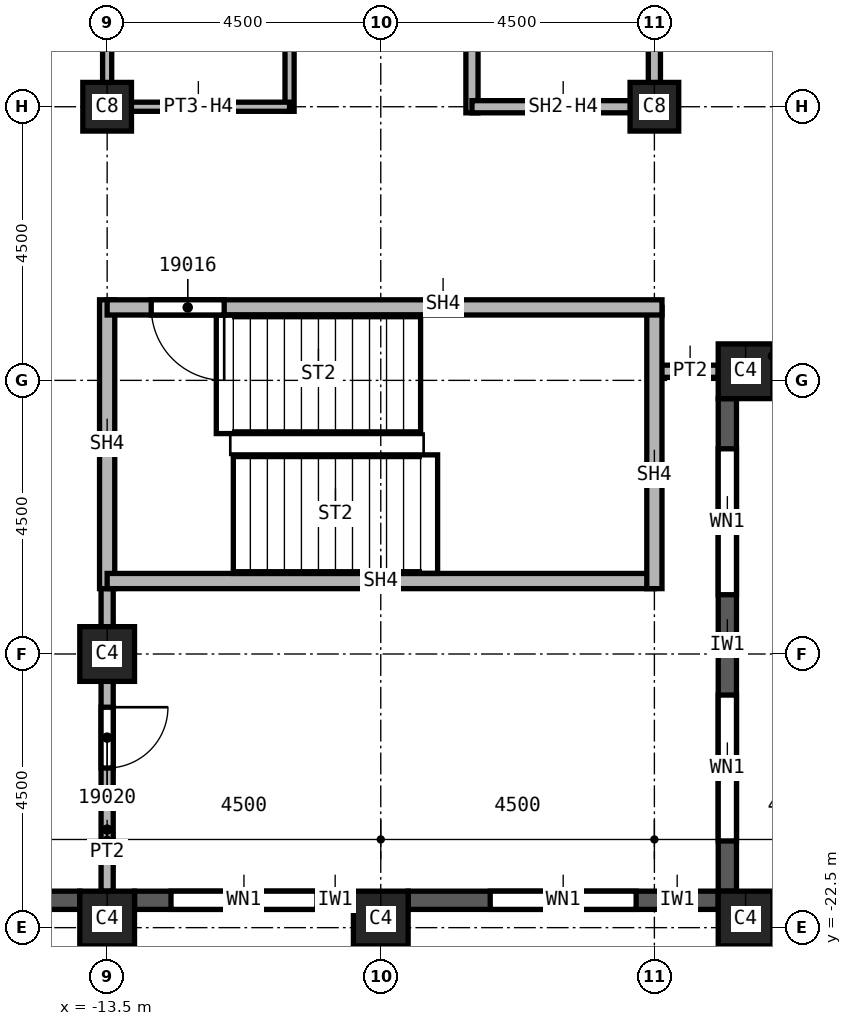
"""IFC4 building model, lengths in metres.
Left out: names, types, materials, properties, quantities, classifications, styles, units other than length and angle.
Written with IfcOpenShell. Run it as: python <this file> out.ifc"""

import sys

from ifc_helpers import new_model, si_unit, direction, frame, frame_2d, origin, origin_2d, place, context, subcontext, project, spatial, rectangle, extrude, element, fill, save


model = new_model("IFC4")
c1 = context("Model", 3, precision=1e-05, world=origin(), true_north=direction((0.0, 1.0)))
c2 = subcontext(c1, "Body", "Model", "MODEL_VIEW")
j1 = project(units=[si_unit("LENGTHUNIT", "METRE"), si_unit("PLANEANGLEUNIT", "RADIAN")], contexts=[c1])
p1 = place(None, origin())
s1 = spatial("IfcSite", under=j1, at=p1, CompositionType="ELEMENT")
p2 = place(p1, origin())
s2 = spatial("IfcBuilding", under=s1, at=p2, CompositionType="ELEMENT")
p3 = place(p2, frame((0.0, 0.0, 282.0)))
s3 = spatial("IfcBuildingStorey", under=s2, at=p3, CompositionType="ELEMENT", Elevation=282.0)
p4 = place(p3, frame((-13.5, -18.0, 0.0), z_axis=(0.0, 0.0, 1.0), x_axis=(1.0, 0.0, 0.0)))
e1 = element("IfcColumn", 1, at=p4, inside=s3, PredefinedType="COLUMN", context=c2, shape_type="SweptSolid", body=[
    extrude(rectangle(XDim=0.9, YDim=0.9, at=origin_2d()), origin(), (0.0, 0.0, 1.0), 3.72),
])
for number, where, z_axis, x_axis in (
    (2, (-4.5, -9.0, 0.0), (0.0, 0.0, 1.0), (1.0, 0.0, 0.0)),
    (3, (-13.5, -9.0, 0.0), (0.0, 0.0, 1.0), (1.0, 0.0, 0.0)),
):
    element("IfcColumn", number, at=place(p3, frame(where, z_axis=z_axis, x_axis=x_axis)), inside=s3, PredefinedType="COLUMN", context=c2, shape_type="SweptSolid", body=[
        extrude(rectangle(XDim=0.8, YDim=0.8, at=origin_2d()), origin(), (0.0, 0.0, 1.0), 3.72),
    ])
for number, where, z_axis, x_axis in (
    (4, (-3.0, -22.35, 0.0), (0.0, 0.0, 1.0), (1.0, 0.0, 0.0)),
    (5, (-9.0, -22.35, 0.0), (0.0, 0.0, 1.0), (1.0, 0.0, 0.0)),
    (6, (-13.5, -22.35, 0.0), (0.0, 0.0, 1.0), (1.0, 0.0, 0.0)),
    (7, (-3.0, -13.35, 0.0), (0.0, 0.0, 1.0), (1.0, 0.0, 0.0)),
):
    element("IfcColumn", number, at=place(p3, frame(where, z_axis=z_axis, x_axis=x_axis)), inside=s3, PredefinedType="COLUMN", context=c2, shape_type="SweptSolid", body=[
        extrude(rectangle(XDim=0.9, YDim=0.9, at=origin_2d()), origin(), (0.0, 0.0, 1.0), 3.72),
    ])
p5 = place(p3, frame((-17.55, -22.05, 0.0), z_axis=(0.0, 0.0, 1.0), x_axis=(1.0, 0.0, 0.0)))
e8 = element("IfcWall", 8, at=p5, inside=s3, PredefinedType="SOLIDWALL", context=c2, shape_type="SweptSolid", body=[
    extrude(rectangle(XDim=3.6, YDim=0.3, at=frame_2d((1.8, 0.0))), origin(), (0.0, 0.0, 1.0), 3.12),
])
p6 = place(p5, frame((0.775, 0.0, 0.8)))
e9 = element("IfcOpeningElement", 9, at=p6, cuts=e8, PredefinedType="OPENING", context=c2, shape_type="SweptSolid", body=[
    extrude(rectangle(XDim=1.0, YDim=1.95, at=frame_2d((0.5, 0.975))), frame((0.0, 0.15, 0.0), z_axis=(0.0, -1.0, 0.0), x_axis=(1.0, 0.0, 0.0)), (0.0, 0.0, 1.0), 0.3),
])
p7 = place(p5, frame((2.375, 0.0, 0.8)))
e10 = element("IfcOpeningElement", 10, at=p7, cuts=e8, PredefinedType="OPENING", context=c2, shape_type="SweptSolid", body=[
    extrude(rectangle(XDim=0.6, YDim=1.95, at=frame_2d((0.3, 0.975))), frame((0.0, 0.15, 0.0), z_axis=(0.0, -1.0, 0.0), x_axis=(1.0, 0.0, 0.0)), (0.0, 0.0, 1.0), 0.3),
])
p8 = place(p3, frame((-13.05, -22.05, 0.0), z_axis=(0.0, 0.0, 1.0), x_axis=(1.0, 0.0, 0.0)))
e11 = element("IfcWall", 11, at=p8, inside=s3, PredefinedType="SOLIDWALL", context=c2, shape_type="SweptSolid", body=[
    extrude(rectangle(XDim=3.6, YDim=0.3, at=frame_2d((1.8, 0.0))), origin(), (0.0, 0.0, 1.0), 3.12),
])
p9 = place(p8, frame((0.6, 0.0, 0.8)))
e12 = element("IfcOpeningElement", 12, at=p9, cuts=e11, PredefinedType="OPENING", context=c2, shape_type="SweptSolid", body=[
    extrude(rectangle(XDim=2.4, YDim=1.95, at=frame_2d((1.2, 0.975))), frame((0.0, 0.15, 0.0), z_axis=(0.0, -1.0, 0.0), x_axis=(1.0, 0.0, 0.0)), (0.0, 0.0, 1.0), 0.3),
])
p10 = place(p3, frame((-8.55, -22.05, 0.0), z_axis=(0.0, 0.0, 1.0), x_axis=(1.0, 0.0, 0.0)))
e13 = element("IfcWall", 13, at=p10, inside=s3, PredefinedType="SOLIDWALL", context=c2, shape_type="SweptSolid", body=[
    extrude(rectangle(XDim=5.1, YDim=0.3, at=frame_2d((2.55, 0.0))), origin(), (0.0, 0.0, 1.0), 3.12),
])
p11 = place(p10, frame((1.35, 0.0, 0.8)))
e14 = element("IfcOpeningElement", 14, at=p11, cuts=e13, PredefinedType="OPENING", context=c2, shape_type="SweptSolid", body=[
    extrude(rectangle(XDim=2.4, YDim=1.95, at=frame_2d((1.2, 0.975))), frame((0.0, 0.15, 0.0), z_axis=(0.0, -1.0, 0.0), x_axis=(1.0, 0.0, 0.0)), (0.0, 0.0, 1.0), 0.3),
])
p12 = place(p3, frame((-3.3, -21.9, 0.0), z_axis=(0.0, 0.0, 1.0), x_axis=(0.0, 1.0, 0.0)))
e15 = element("IfcWall", 15, at=p12, inside=s3, PredefinedType="SOLIDWALL", context=c2, shape_type="SweptSolid", body=[
    extrude(rectangle(XDim=8.1, YDim=0.3, at=frame_2d((4.05, 0.0))), origin(), (0.0, 0.0, 1.0), 3.12),
])
p13 = place(p12, frame((0.825, 0.0, 0.8)))
e16 = element("IfcOpeningElement", 16, at=p13, cuts=e15, PredefinedType="OPENING", context=c2, shape_type="SweptSolid", body=[
    extrude(rectangle(XDim=2.4, YDim=1.95, at=frame_2d((1.2, 0.975))), frame((0.0, 0.15, 0.0), z_axis=(0.0, -1.0, 0.0), x_axis=(1.0, 0.0, 0.0)), (0.0, 0.0, 1.0), 0.3),
])
p14 = place(p12, frame((4.875, 0.0, 0.8)))
e17 = element("IfcOpeningElement", 17, at=p14, cuts=e15, PredefinedType="OPENING", context=c2, shape_type="SweptSolid", body=[
    extrude(rectangle(XDim=2.4, YDim=1.95, at=frame_2d((1.2, 0.975))), frame((0.0, 0.15, 0.0), z_axis=(0.0, -1.0, 0.0), x_axis=(1.0, 0.0, 0.0)), (0.0, 0.0, 1.0), 0.3),
])
p15 = place(p3, frame((-13.5, -16.675, 0.0), z_axis=(0.0, 0.0, 1.0), x_axis=(0.0, -1.0, 0.0)))
e18 = element("IfcWall", 18, at=p15, inside=s3, PredefinedType="PARTITIONING", context=c2, shape_type="SweptSolid", body=[
    extrude(rectangle(XDim=5.225, YDim=0.2, at=frame_2d((2.612, 0.0))), origin(), (0.0, 0.0, 1.0), 3.72),
])
p16 = place(p15, frame((2.2, 0.0, 0.0)))
e19 = element("IfcOpeningElement", 19, at=p16, cuts=e18, PredefinedType="OPENING", context=c2, shape_type="SweptSolid", body=[
    extrude(rectangle(XDim=1.0, YDim=2.1, at=frame_2d((0.5, 1.05))), frame((0.0, 0.1, 0.0), z_axis=(0.0, -1.0, 0.0), x_axis=(1.0, 0.0, 0.0)), (0.0, 0.0, 1.0), 0.2),
])
p17 = place(p3, frame((-3.45, -13.35, 0.0), z_axis=(0.0, 0.0, 1.0), x_axis=(-1.0, 0.0, 0.0)))
e20 = element("IfcWall", 20, at=p17, inside=s3, PredefinedType="PARTITIONING", context=c2, shape_type="SweptSolid", body=[
    extrude(rectangle(XDim=1.05, YDim=0.2, at=frame_2d((0.525, 0.0))), origin(), (0.0, 0.0, 1.0), 3.72),
])
p18 = place(p3, frame((-7.5, -9.1, 0.0), z_axis=(0.0, 0.0, 1.0), x_axis=(0.0, 1.0, 0.0)))
e21 = element("IfcWall", 21, at=p18, inside=s3, PredefinedType="SOLIDWALL", context=c2, shape_type="SweptSolid", body=[
    extrude(rectangle(XDim=6.225, YDim=0.2, at=frame_2d((3.113, 0.0))), origin(), (0.0, 0.0, 1.0), 3.72),
])
p19 = place(p3, frame((-4.5, -9.0, 0.0), z_axis=(0.0, 0.0, 1.0), x_axis=(-1.0, 0.0, 0.0)))
e22 = element("IfcWall", 22, at=p19, inside=s3, PredefinedType="SOLIDWALL", context=c2, shape_type="SweptSolid", body=[
    extrude(rectangle(XDim=3.0, YDim=0.2, at=frame_2d((1.5, 0.0))), origin(), (0.0, 0.0, 1.0), 3.042),
])
p20 = place(p3, frame((-4.5, 0.0, 0.0), z_axis=(0.0, 0.0, 1.0), x_axis=(0.0, -1.0, 0.0)))
e23 = element("IfcWall", 23, at=p20, inside=s3, PredefinedType="SOLIDWALL", context=c2, shape_type="SweptSolid", body=[
    extrude(rectangle(XDim=9.1, YDim=0.2, at=frame_2d((4.55, 0.0))), origin(), (0.0, 0.0, 1.0), 3.042),
])
p21 = place(p20, frame((1.3, 0.0, 0.0)))
e24 = element("IfcOpeningElement", 24, at=p21, cuts=e23, PredefinedType="OPENING", context=c2, shape_type="SweptSolid", body=[
    extrude(rectangle(XDim=1.1, YDim=2.1, at=frame_2d((0.55, 1.05))), frame((0.0, 0.1, 0.0), z_axis=(0.0, -1.0, 0.0), x_axis=(1.0, 0.0, 0.0)), (0.0, 0.0, 1.0), 0.2),
])
p22 = place(p3, frame((-13.5, -12.175, 0.0), z_axis=(0.0, 0.0, 1.0), x_axis=(0.0, -1.0, 0.0)))
e25 = element("IfcWall", 25, at=p22, inside=s3, PredefinedType="SOLIDWALL", context=c2, shape_type="SweptSolid", body=[
    extrude(rectangle(XDim=4.75, YDim=0.25, at=frame_2d((2.375, 0.0))), origin(), (0.0, 0.0, 1.0), 3.72),
])
p23 = place(p3, frame((-4.5, -16.8, 0.0), z_axis=(0.0, 0.0, 1.0), x_axis=(-1.0, 0.0, 0.0)))
e26 = element("IfcWall", 26, at=p23, inside=s3, PredefinedType="SOLIDWALL", context=c2, shape_type="SweptSolid", body=[
    extrude(rectangle(XDim=9.0, YDim=0.25, at=frame_2d((4.5, 0.0))), origin(), (0.0, 0.0, 1.0), 3.72),
])
p24 = place(p3, frame((-4.5, -12.3, 0.0), z_axis=(0.0, 0.0, 1.0), x_axis=(0.0, -1.0, 0.0)))
e27 = element("IfcWall", 27, at=p24, inside=s3, PredefinedType="SOLIDWALL", context=c2, shape_type="SweptSolid", body=[
    extrude(rectangle(XDim=4.625, YDim=0.25, at=frame_2d((2.312, 0.0))), origin(), (0.0, 0.0, 1.0), 3.72),
])
p25 = place(p3, frame((-4.375, -12.3, 0.0), z_axis=(0.0, 0.0, 1.0), x_axis=(-1.0, 0.0, 0.0)))
e28 = element("IfcWall", 28, at=p25, inside=s3, PredefinedType="SOLIDWALL", context=c2, shape_type="SweptSolid", body=[
    extrude(rectangle(XDim=9.125, YDim=0.25, at=frame_2d((4.562, 0.0))), origin(), (0.0, 0.0, 1.0), 3.72),
])
p26 = place(p25, frame((7.2, 0.0, 0.0)))
e29 = element("IfcOpeningElement", 29, at=p26, cuts=e28, PredefinedType="OPENING", context=c2, shape_type="SweptSolid", body=[
    extrude(rectangle(XDim=1.2, YDim=2.1, at=frame_2d((0.6, 1.05))), frame((0.0, 0.125, 0.0), z_axis=(0.0, -1.0, 0.0), x_axis=(1.0, 0.0, 0.0)), (0.0, 0.0, 1.0), 0.25),
])
p27 = place(p3, frame((-13.5, -9.075, 0.0), z_axis=(0.0, 0.0, 1.0), x_axis=(0.0, 1.0, 0.0)))
e30 = element("IfcWall", 30, at=p27, inside=s3, PredefinedType="PARTITIONING", context=c2, shape_type="SweptSolid", body=[
    extrude(rectangle(XDim=6.075, YDim=0.15, at=frame_2d((3.038, 0.0))), origin(), (0.0, 0.0, 1.0), 3.042),
])
p28 = place(p3, frame((-10.5, -9.075, 0.0), z_axis=(0.0, 0.0, 1.0), x_axis=(0.0, 1.0, 0.0)))
e31 = element("IfcWall", 31, at=p28, inside=s3, PredefinedType="PARTITIONING", context=c2, shape_type="SweptSolid", body=[
    extrude(rectangle(XDim=6.2, YDim=0.15, at=frame_2d((3.1, 0.0))), origin(), (0.0, 0.0, 1.0), 3.72),
])
p29 = place(p28, frame((4.45, 0.0, 0.0)))
e32 = element("IfcOpeningElement", 32, at=p29, cuts=e31, PredefinedType="OPENING", context=c2, shape_type="SweptSolid", body=[
    extrude(rectangle(XDim=0.9, YDim=2.1, at=frame_2d((0.45, 1.05))), frame((0.0, 0.075, 0.0), z_axis=(0.0, -1.0, 0.0), x_axis=(1.0, 0.0, 0.0)), (0.0, 0.0, 1.0), 0.15),
])
p30 = place(p3, frame((-10.5, -9.0, 0.0), z_axis=(0.0, 0.0, 1.0), x_axis=(-1.0, 0.0, 0.0)))
e33 = element("IfcWall", 33, at=p30, inside=s3, PredefinedType="PARTITIONING", context=c2, shape_type="SweptSolid", body=[
    extrude(rectangle(XDim=3.0, YDim=0.15, at=frame_2d((1.5, 0.0))), origin(), (0.0, 0.0, 1.0), 3.042),
])
p31 = place(p9, origin())
e34 = element("IfcWindow", 34, at=p31, inside=s3, PartitioningType="SINGLE_PANEL", PredefinedType="WINDOW", context=c2, shape_type="SweptSolid", body=[
    extrude(rectangle(XDim=2.4, YDim=1.95, at=frame_2d((1.2, 0.975))), frame((0.0, 0.03, 0.0), z_axis=(0.0, -1.0, 0.0), x_axis=(1.0, 0.0, 0.0)), (0.0, 0.0, 1.0), 0.06),
])
fill(e12, e34)
p32 = place(p11, origin())
e35 = element("IfcWindow", 35, at=p32, inside=s3, PartitioningType="SINGLE_PANEL", PredefinedType="WINDOW", context=c2, shape_type="SweptSolid", body=[
    extrude(rectangle(XDim=2.4, YDim=1.95, at=frame_2d((1.2, 0.975))), frame((0.0, 0.03, 0.0), z_axis=(0.0, -1.0, 0.0), x_axis=(1.0, 0.0, 0.0)), (0.0, 0.0, 1.0), 0.06),
])
fill(e14, e35)
p33 = place(p13, origin())
e36 = element("IfcWindow", 36, at=p33, inside=s3, PartitioningType="SINGLE_PANEL", PredefinedType="WINDOW", context=c2, shape_type="SweptSolid", body=[
    extrude(rectangle(XDim=2.4, YDim=1.95, at=frame_2d((1.2, 0.975))), frame((0.0, 0.03, 0.0), z_axis=(0.0, -1.0, 0.0), x_axis=(1.0, 0.0, 0.0)), (0.0, 0.0, 1.0), 0.06),
])
fill(e16, e36)
p34 = place(p14, origin())
e37 = element("IfcWindow", 37, at=p34, inside=s3, PartitioningType="SINGLE_PANEL", PredefinedType="WINDOW", context=c2, shape_type="SweptSolid", body=[
    extrude(rectangle(XDim=2.4, YDim=1.95, at=frame_2d((1.2, 0.975))), frame((0.0, 0.03, 0.0), z_axis=(0.0, -1.0, 0.0), x_axis=(1.0, 0.0, 0.0)), (0.0, 0.0, 1.0), 0.06),
])
fill(e17, e37)
p35 = place(p26, origin())
e38 = element("IfcDoor", 38, at=p35, inside=s3, OperationType="SINGLE_SWING_LEFT", PredefinedType="DOOR", context=c2, shape_type="SweptSolid", body=[
    extrude(rectangle(XDim=1.2, YDim=2.1, at=frame_2d((0.6, 1.05))), frame((0.0, 0.025, 0.0), z_axis=(0.0, -1.0, 0.0), x_axis=(1.0, 0.0, 0.0)), (0.0, 0.0, 1.0), 0.05),
])
fill(e29, e38)
p36 = place(p16, origin())
e39 = element("IfcDoor", 39, at=p36, inside=s3, OperationType="SINGLE_SWING_LEFT", PredefinedType="DOOR", context=c2, shape_type="SweptSolid", body=[
    extrude(rectangle(XDim=1.0, YDim=2.1, at=frame_2d((0.5, 1.05))), frame((0.0, 0.025, 0.0), z_axis=(0.0, -1.0, 0.0), x_axis=(1.0, 0.0, 0.0)), (0.0, 0.0, 1.0), 0.05),
])
fill(e19, e39)
save(model, sys.argv[1])
